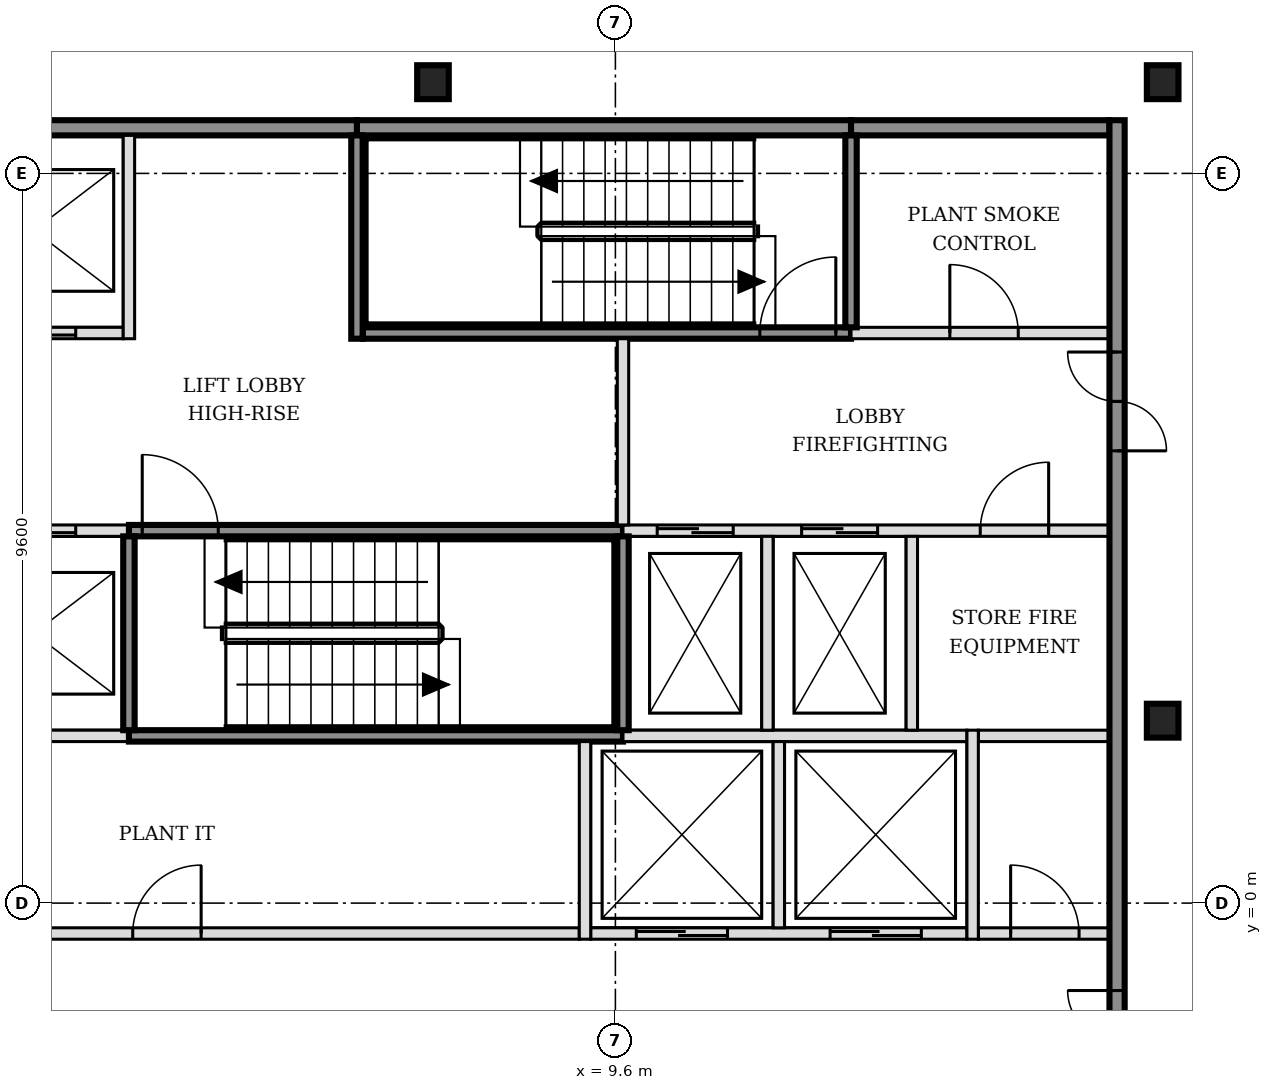
"""IFC4 building model, lengths in metres.
Left out: names, types, materials, properties, quantities, classifications, styles, units other than length and angle.
Written with IfcOpenShell. Run it as: python <this file> out.ifc"""

import sys

from ifc_helpers import new_model, si_unit, direction, frame, frame_2d, origin, origin_2d, place, context, subcontext, project, spatial, rectangle, i_section, extrude, element, fill, save


model = new_model("IFC4")
c1 = context("Model", 3, precision=1e-05, world=origin(), true_north=direction((0.0, 1.0)))
c2 = subcontext(c1, "Body", "Model", "MODEL_VIEW")
j1 = project(units=[si_unit("LENGTHUNIT", "METRE"), si_unit("PLANEANGLEUNIT", "RADIAN")], contexts=[c1])
p1 = place(None, origin())
s1 = spatial("IfcSite", under=j1, at=p1, CompositionType="ELEMENT")
p2 = place(p1, origin())
s2 = spatial("IfcBuilding", under=s1, at=p2, CompositionType="ELEMENT")
p3 = place(p2, frame((0.0, 0.0, 186.6)))
s3 = spatial("IfcBuildingStorey", under=s2, at=p3, CompositionType="ELEMENT", Elevation=186.6)
for number, where, z_axis, x_axis in (
    (1, (16.8, 2.4, -0.15), (0.0, 0.0, 1.0), (1.0, 0.0, 0.0)),
    (2, (7.2, 10.8, -0.15), (0.0, 0.0, 1.0), (1.0, 0.0, 0.0)),
    (3, (16.8, 10.8, -0.15), (0.0, 0.0, 1.0), (1.0, 0.0, 0.0)),
):
    element("IfcColumn", number, at=place(p3, frame(where, z_axis=z_axis, x_axis=x_axis)), inside=s3, PredefinedType="COLUMN", context=c2, shape_type="SweptSolid", body=[
        extrude(i_section(OverallWidth=0.416, OverallDepth=0.446, WebThickness=0.039, FlangeThickness=0.063, FilletRadius=0.015, at=origin_2d()), origin(), (0.0, 0.0, 1.0), 3.6),
    ])
p4 = place(p3, frame((-1.7, -0.4, 0.0), z_axis=(0.0, 0.0, 1.0), x_axis=(1.0, 0.0, 0.0)))
e4 = element("IfcWall", 4, at=p4, inside=s3, PredefinedType="PARTITIONING", context=c2, shape_type="SweptSolid", body=[
    extrude(rectangle(XDim=10.825, YDim=0.15, at=frame_2d((5.413, 0.0))), origin(), (0.0, 0.0, 1.0), 3.45),
])
p5 = place(p4, frame((4.95, 0.0, 0.0)))
e5 = element("IfcOpeningElement", 5, at=p5, cuts=e4, PredefinedType="OPENING", context=c2, shape_type="SweptSolid", body=[
    extrude(rectangle(XDim=0.9, YDim=2.1, at=frame_2d((0.45, 1.05))), frame((0.0, 0.085, 0.0), z_axis=(0.0, -1.0, 0.0), x_axis=(1.0, 0.0, 0.0)), (0.0, 0.0, 1.0), 0.17),
])
p6 = place(p3, frame((9.275, -0.4, 0.0), z_axis=(0.0, 0.0, 1.0), x_axis=(1.0, 0.0, 0.0)))
e6 = element("IfcWall", 6, at=p6, inside=s3, PredefinedType="SOLIDWALL", context=c2, shape_type="SweptSolid", body=[
    extrude(rectangle(XDim=4.95, YDim=0.15, at=frame_2d((2.475, 0.0))), origin(), (0.0, 0.0, 1.0), 3.45),
])
p7 = place(p6, frame((0.6, 0.0, 0.0)))
e7 = element("IfcOpeningElement", 7, at=p7, cuts=e6, PredefinedType="OPENING", context=c2, shape_type="SweptSolid", body=[
    extrude(rectangle(XDim=1.2, YDim=2.1, at=frame_2d((0.6, 1.05))), frame((0.0, 0.085, 0.0), z_axis=(0.0, -1.0, 0.0), x_axis=(1.0, 0.0, 0.0)), (0.0, 0.0, 1.0), 0.17),
])
p8 = place(p6, frame((3.15, 0.0, 0.0)))
e8 = element("IfcOpeningElement", 8, at=p8, cuts=e6, PredefinedType="OPENING", context=c2, shape_type="SweptSolid", body=[
    extrude(rectangle(XDim=1.2, YDim=2.1, at=frame_2d((0.6, 1.05))), frame((0.0, 0.085, 0.0), z_axis=(0.0, -1.0, 0.0), x_axis=(1.0, 0.0, 0.0)), (0.0, 0.0, 1.0), 0.17),
])
p9 = place(p3, frame((14.375, -0.4, 0.0), z_axis=(0.0, 0.0, 1.0), x_axis=(1.0, 0.0, 0.0)))
e9 = element("IfcWall", 9, at=p9, inside=s3, PredefinedType="PARTITIONING", context=c2, shape_type="SweptSolid", body=[
    extrude(rectangle(XDim=1.725, YDim=0.15, at=frame_2d((0.863, 0.0))), origin(), (0.0, 0.0, 1.0), 3.45),
])
p10 = place(p9, frame((0.425, 0.0, 0.0)))
e10 = element("IfcOpeningElement", 10, at=p10, cuts=e9, PredefinedType="OPENING", context=c2, shape_type="SweptSolid", body=[
    extrude(rectangle(XDim=0.9, YDim=2.1, at=frame_2d((0.45, 1.05))), frame((0.0, 0.085, 0.0), z_axis=(0.0, -1.0, 0.0), x_axis=(1.0, 0.0, 0.0)), (0.0, 0.0, 1.0), 0.17),
])
p11 = place(p3, frame((-1.7, 2.2, 0.0), z_axis=(0.0, 0.0, 1.0), x_axis=(1.0, 0.0, 0.0)))
e11 = element("IfcWall", 11, at=p11, inside=s3, PredefinedType="SOLIDWALL", context=c2, shape_type="SweptSolid", body=[
    extrude(rectangle(XDim=4.9, YDim=0.15, at=frame_2d((2.45, 0.0))), origin(), (0.0, 0.0, 1.0), 3.45),
])
p12 = place(p3, frame((3.2, 2.2, 0.0), z_axis=(0.0, 0.0, 1.0), x_axis=(1.0, 0.0, 0.0)))
e12 = element("IfcWall", 12, at=p12, inside=s3, PredefinedType="SOLIDWALL", context=c2, shape_type="SweptSolid", body=[
    extrude(rectangle(XDim=6.5, YDim=0.15, at=frame_2d((3.25, 0.0))), origin(), (0.0, 0.0, 1.0), 3.45),
])
p13 = place(p3, frame((9.7, 2.2, 0.0), z_axis=(0.0, 0.0, 1.0), x_axis=(1.0, 0.0, 0.0)))
e13 = element("IfcWall", 13, at=p13, inside=s3, PredefinedType="SOLIDWALL", context=c2, shape_type="SweptSolid", body=[
    extrude(rectangle(XDim=4.525, YDim=0.15, at=frame_2d((2.263, 0.0))), origin(), (0.0, 0.0, 1.0), 3.45),
])
p14 = place(p3, frame((14.375, 2.2, 0.0), z_axis=(0.0, 0.0, 1.0), x_axis=(1.0, 0.0, 0.0)))
e14 = element("IfcWall", 14, at=p14, inside=s3, PredefinedType="PARTITIONING", context=c2, shape_type="SweptSolid", body=[
    extrude(rectangle(XDim=1.725, YDim=0.15, at=frame_2d((0.863, 0.0))), origin(), (0.0, 0.0, 1.0), 3.45),
])
p15 = place(p3, frame((-1.7, 4.9, 0.0), z_axis=(0.0, 0.0, 1.0), x_axis=(1.0, 0.0, 0.0)))
e15 = element("IfcWall", 15, at=p15, inside=s3, PredefinedType="SOLIDWALL", context=c2, shape_type="SweptSolid", body=[
    extrude(rectangle(XDim=4.9, YDim=0.15, at=frame_2d((2.45, 0.0))), origin(), (0.0, 0.0, 1.0), 3.45),
])
p16 = place(p15, frame((0.6, 0.0, 0.0)))
e16 = element("IfcOpeningElement", 16, at=p16, cuts=e15, PredefinedType="OPENING", context=c2, shape_type="SweptSolid", body=[
    extrude(rectangle(XDim=1.1, YDim=2.1, at=frame_2d((0.55, 1.05))), frame((0.0, 0.085, 0.0), z_axis=(0.0, -1.0, 0.0), x_axis=(1.0, 0.0, 0.0)), (0.0, 0.0, 1.0), 0.17),
])
p17 = place(p15, frame((3.1, 0.0, 0.0)))
e17 = element("IfcOpeningElement", 17, at=p17, cuts=e15, PredefinedType="OPENING", context=c2, shape_type="SweptSolid", body=[
    extrude(rectangle(XDim=1.1, YDim=2.1, at=frame_2d((0.55, 1.05))), frame((0.0, 0.085, 0.0), z_axis=(0.0, -1.0, 0.0), x_axis=(1.0, 0.0, 0.0)), (0.0, 0.0, 1.0), 0.17),
])
p18 = place(p3, frame((3.2, 4.9, 0.0), z_axis=(0.0, 0.0, 1.0), x_axis=(1.0, 0.0, 0.0)))
e18 = element("IfcWall", 18, at=p18, inside=s3, PredefinedType="SOLIDWALL", context=c2, shape_type="SweptSolid", body=[
    extrude(rectangle(XDim=6.5, YDim=0.15, at=frame_2d((3.25, 0.0))), origin(), (0.0, 0.0, 1.0), 3.45),
])
p19 = place(p18, frame((0.175, 0.0, 0.0)))
e19 = element("IfcOpeningElement", 19, at=p19, cuts=e18, PredefinedType="OPENING", context=c2, shape_type="SweptSolid", body=[
    extrude(rectangle(XDim=1.0, YDim=2.1, at=frame_2d((0.5, 1.05))), frame((0.0, 0.085, 0.0), z_axis=(0.0, -1.0, 0.0), x_axis=(1.0, 0.0, 0.0)), (0.0, 0.0, 1.0), 0.17),
])
p20 = place(p3, frame((9.7, 4.9, 0.0), z_axis=(0.0, 0.0, 1.0), x_axis=(1.0, 0.0, 0.0)))
e20 = element("IfcWall", 20, at=p20, inside=s3, PredefinedType="SOLIDWALL", context=c2, shape_type="SweptSolid", body=[
    extrude(rectangle(XDim=6.4, YDim=0.15, at=frame_2d((3.2, 0.0))), origin(), (0.0, 0.0, 1.0), 3.45),
])
p21 = place(p20, frame((0.45, 0.0, 0.0)))
e21 = element("IfcOpeningElement", 21, at=p21, cuts=e20, PredefinedType="OPENING", context=c2, shape_type="SweptSolid", body=[
    extrude(rectangle(XDim=1.0, YDim=2.1, at=frame_2d((0.5, 1.05))), frame((0.0, 0.085, 0.0), z_axis=(0.0, -1.0, 0.0), x_axis=(1.0, 0.0, 0.0)), (0.0, 0.0, 1.0), 0.17),
])
p22 = place(p20, frame((2.35, 0.0, 0.0)))
e22 = element("IfcOpeningElement", 22, at=p22, cuts=e20, PredefinedType="OPENING", context=c2, shape_type="SweptSolid", body=[
    extrude(rectangle(XDim=1.0, YDim=2.1, at=frame_2d((0.5, 1.05))), frame((0.0, 0.085, 0.0), z_axis=(0.0, -1.0, 0.0), x_axis=(1.0, 0.0, 0.0)), (0.0, 0.0, 1.0), 0.17),
])
p23 = place(p20, frame((4.7, 0.0, 0.0)))
e23 = element("IfcOpeningElement", 23, at=p23, cuts=e20, PredefinedType="OPENING", context=c2, shape_type="SweptSolid", body=[
    extrude(rectangle(XDim=0.9, YDim=2.1, at=frame_2d((0.45, 1.05))), frame((0.0, 0.085, 0.0), z_axis=(0.0, -1.0, 0.0), x_axis=(1.0, 0.0, 0.0)), (0.0, 0.0, 1.0), 0.17),
])
p24 = place(p3, frame((-1.7, 7.5, 0.0), z_axis=(0.0, 0.0, 1.0), x_axis=(1.0, 0.0, 0.0)))
e24 = element("IfcWall", 24, at=p24, inside=s3, PredefinedType="SOLIDWALL", context=c2, shape_type="SweptSolid", body=[
    extrude(rectangle(XDim=4.825, YDim=0.15, at=frame_2d((2.413, 0.0))), origin(), (0.0, 0.0, 1.0), 3.45),
])
p25 = place(p24, frame((0.6, 0.0, 0.0)))
e25 = element("IfcOpeningElement", 25, at=p25, cuts=e24, PredefinedType="OPENING", context=c2, shape_type="SweptSolid", body=[
    extrude(rectangle(XDim=1.1, YDim=2.1, at=frame_2d((0.55, 1.05))), frame((0.0, 0.085, 0.0), z_axis=(0.0, -1.0, 0.0), x_axis=(1.0, 0.0, 0.0)), (0.0, 0.0, 1.0), 0.17),
])
p26 = place(p24, frame((3.1, 0.0, 0.0)))
e26 = element("IfcOpeningElement", 26, at=p26, cuts=e24, PredefinedType="OPENING", context=c2, shape_type="SweptSolid", body=[
    extrude(rectangle(XDim=1.1, YDim=2.1, at=frame_2d((0.55, 1.05))), frame((0.0, 0.085, 0.0), z_axis=(0.0, -1.0, 0.0), x_axis=(1.0, 0.0, 0.0)), (0.0, 0.0, 1.0), 0.17),
])
p27 = place(p3, frame((6.275, 7.5, 0.0), z_axis=(0.0, 0.0, 1.0), x_axis=(1.0, 0.0, 0.0)))
e27 = element("IfcWall", 27, at=p27, inside=s3, PredefinedType="SOLIDWALL", context=c2, shape_type="SweptSolid", body=[
    extrude(rectangle(XDim=6.425, YDim=0.15, at=frame_2d((3.212, 0.0))), origin(), (0.0, 0.0, 1.0), 3.45),
])
p28 = place(p27, frame((5.225, 0.0, 0.0)))
e28 = element("IfcOpeningElement", 28, at=p28, cuts=e27, PredefinedType="OPENING", context=c2, shape_type="SweptSolid", body=[
    extrude(rectangle(XDim=1.0, YDim=2.1, at=frame_2d((0.5, 1.05))), frame((0.0, 0.085, 0.0), z_axis=(0.0, -1.0, 0.0), x_axis=(1.0, 0.0, 0.0)), (0.0, 0.0, 1.0), 0.17),
])
p29 = place(p3, frame((12.7, 7.5, 0.0), z_axis=(0.0, 0.0, 1.0), x_axis=(1.0, 0.0, 0.0)))
e29 = element("IfcWall", 29, at=p29, inside=s3, PredefinedType="SOLIDWALL", context=c2, shape_type="SweptSolid", body=[
    extrude(rectangle(XDim=3.4, YDim=0.15, at=frame_2d((1.7, 0.0))), origin(), (0.0, 0.0, 1.0), 3.45),
])
p30 = place(p29, frame((1.3, 0.0, 0.0)))
e30 = element("IfcOpeningElement", 30, at=p30, cuts=e29, PredefinedType="OPENING", context=c2, shape_type="SweptSolid", body=[
    extrude(rectangle(XDim=0.9, YDim=2.1, at=frame_2d((0.45, 1.05))), frame((0.0, 0.085, 0.0), z_axis=(0.0, -1.0, 0.0), x_axis=(1.0, 0.0, 0.0)), (0.0, 0.0, 1.0), 0.17),
])
p31 = place(p3, frame((-1.7, 10.2, 0.0), z_axis=(0.0, 0.0, 1.0), x_axis=(1.0, 0.0, 0.0)))
e31 = element("IfcWall", 31, at=p31, inside=s3, PredefinedType="SOLIDWALL", context=c2, shape_type="SweptSolid", body=[
    extrude(rectangle(XDim=7.9, YDim=0.2, at=frame_2d((3.95, 0.0))), origin(), (0.0, 0.0, 1.0), 3.45),
])
p32 = place(p3, frame((6.2, 10.2, 0.0), z_axis=(0.0, 0.0, 1.0), x_axis=(1.0, 0.0, 0.0)))
e32 = element("IfcWall", 32, at=p32, inside=s3, PredefinedType="SOLIDWALL", context=c2, shape_type="SweptSolid", body=[
    extrude(rectangle(XDim=6.5, YDim=0.2, at=frame_2d((3.25, 0.0))), origin(), (0.0, 0.0, 1.0), 3.45),
])
p33 = place(p3, frame((12.7, 10.2, 0.0), z_axis=(0.0, 0.0, 1.0), x_axis=(1.0, 0.0, 0.0)))
e33 = element("IfcWall", 33, at=p33, inside=s3, PredefinedType="SOLIDWALL", context=c2, shape_type="SweptSolid", body=[
    extrude(rectangle(XDim=3.4, YDim=0.2, at=frame_2d((1.7, 0.0))), origin(), (0.0, 0.0, 1.0), 3.45),
])
p34 = place(p3, frame((3.2, 2.275, 0.0), z_axis=(0.0, 0.0, 1.0), x_axis=(0.0, 1.0, 0.0)))
e34 = element("IfcWall", 34, at=p34, inside=s3, PredefinedType="SOLIDWALL", context=c2, shape_type="SweptSolid", body=[
    extrude(rectangle(XDim=2.55, YDim=0.15, at=frame_2d((1.275, 0.0))), origin(), (0.0, 0.0, 1.0), 3.45),
])
for number, where, z_axis, x_axis in (
    (35, (3.2, 7.425, 0.0), (0.0, 0.0, 1.0), (0.0, 1.0, 0.0)),
    (36, (6.2, 7.425, 0.0), (0.0, 0.0, 1.0), (0.0, 1.0, 0.0)),
):
    element("IfcWall", number, at=place(p3, frame(where, z_axis=z_axis, x_axis=x_axis)), inside=s3, PredefinedType="SOLIDWALL", context=c2, shape_type="SweptSolid", body=[
        extrude(rectangle(XDim=2.675, YDim=0.15, at=frame_2d((1.337, 0.0))), origin(), (0.0, 0.0, 1.0), 3.45),
    ])
p35 = place(p3, frame((9.2, -0.475, 0.0), z_axis=(0.0, 0.0, 1.0), x_axis=(0.0, 1.0, 0.0)))
e37 = element("IfcWall", 37, at=p35, inside=s3, PredefinedType="SOLIDWALL", context=c2, shape_type="SweptSolid", body=[
    extrude(rectangle(XDim=2.6, YDim=0.15, at=frame_2d((1.3, 0.0))), origin(), (0.0, 0.0, 1.0), 3.45),
])
p36 = place(p3, frame((9.7, 2.275, 0.0), z_axis=(0.0, 0.0, 1.0), x_axis=(0.0, 1.0, 0.0)))
e38 = element("IfcWall", 38, at=p36, inside=s3, PredefinedType="SOLIDWALL", context=c2, shape_type="SweptSolid", body=[
    extrude(rectangle(XDim=2.55, YDim=0.15, at=frame_2d((1.275, 0.0))), origin(), (0.0, 0.0, 1.0), 3.45),
])
p37 = place(p3, frame((9.7, 4.975, 0.0), z_axis=(0.0, 0.0, 1.0), x_axis=(0.0, 1.0, 0.0)))
e39 = element("IfcWall", 39, at=p37, inside=s3, PredefinedType="SOLIDWALL", context=c2, shape_type="SweptSolid", body=[
    extrude(rectangle(XDim=2.45, YDim=0.15, at=frame_2d((1.225, 0.0))), origin(), (0.0, 0.0, 1.0), 3.45),
])
p38 = place(p3, frame((11.6, 2.275, 0.0), z_axis=(0.0, 0.0, 1.0), x_axis=(0.0, 1.0, 0.0)))
e40 = element("IfcWall", 40, at=p38, inside=s3, PredefinedType="SOLIDWALL", context=c2, shape_type="SweptSolid", body=[
    extrude(rectangle(XDim=2.55, YDim=0.15, at=frame_2d((1.275, 0.0))), origin(), (0.0, 0.0, 1.0), 3.45),
])
p39 = place(p3, frame((11.75, -0.325, 0.0), z_axis=(0.0, 0.0, 1.0), x_axis=(0.0, 1.0, 0.0)))
e41 = element("IfcWall", 41, at=p39, inside=s3, PredefinedType="SOLIDWALL", context=c2, shape_type="SweptSolid", body=[
    extrude(rectangle(XDim=2.45, YDim=0.15, at=frame_2d((1.225, 0.0))), origin(), (0.0, 0.0, 1.0), 3.45),
])
p40 = place(p3, frame((12.7, 7.575, 0.0), z_axis=(0.0, 0.0, 1.0), x_axis=(0.0, 1.0, 0.0)))
e42 = element("IfcWall", 42, at=p40, inside=s3, PredefinedType="SOLIDWALL", context=c2, shape_type="SweptSolid", body=[
    extrude(rectangle(XDim=2.525, YDim=0.15, at=frame_2d((1.263, 0.0))), origin(), (0.0, 0.0, 1.0), 3.45),
])
p41 = place(p3, frame((13.5, 2.275, 0.0), z_axis=(0.0, 0.0, 1.0), x_axis=(0.0, 1.0, 0.0)))
e43 = element("IfcWall", 43, at=p41, inside=s3, PredefinedType="SOLIDWALL", context=c2, shape_type="SweptSolid", body=[
    extrude(rectangle(XDim=2.55, YDim=0.15, at=frame_2d((1.275, 0.0))), origin(), (0.0, 0.0, 1.0), 3.45),
])
p42 = place(p3, frame((14.3, -0.475, 0.0), z_axis=(0.0, 0.0, 1.0), x_axis=(0.0, 1.0, 0.0)))
e44 = element("IfcWall", 44, at=p42, inside=s3, PredefinedType="SOLIDWALL", context=c2, shape_type="SweptSolid", body=[
    extrude(rectangle(XDim=2.75, YDim=0.15, at=frame_2d((1.375, 0.0))), origin(), (0.0, 0.0, 1.0), 3.45),
])
p43 = place(p3, frame((16.2, -5.5, 0.0), z_axis=(0.0, 0.0, 1.0), x_axis=(0.0, 1.0, 0.0)))
e45 = element("IfcWall", 45, at=p43, inside=s3, PredefinedType="SOLIDWALL", context=c2, shape_type="SweptSolid", body=[
    extrude(rectangle(XDim=15.8, YDim=0.2, at=frame_2d((7.9, 0.0))), origin(), (0.0, 0.0, 1.0), 3.45),
])
p44 = place(p43, frame((3.05, 0.0, 0.0)))
e46 = element("IfcOpeningElement", 46, at=p44, cuts=e45, PredefinedType="OPENING", context=c2, shape_type="SweptSolid", body=[
    extrude(rectangle(XDim=1.3, YDim=2.1, at=frame_2d((0.65, 1.05))), frame((0.0, 0.11, 0.0), z_axis=(0.0, -1.0, 0.0), x_axis=(1.0, 0.0, 0.0)), (0.0, 0.0, 1.0), 0.22),
])
p45 = place(p43, frame((11.45, 0.0, 0.0)))
e47 = element("IfcOpeningElement", 47, at=p45, cuts=e45, PredefinedType="OPENING", context=c2, shape_type="SweptSolid", body=[
    extrude(rectangle(XDim=1.3, YDim=2.1, at=frame_2d((0.65, 1.05))), frame((0.0, 0.11, 0.0), z_axis=(0.0, -1.0, 0.0), x_axis=(1.0, 0.0, 0.0)), (0.0, 0.0, 1.0), 0.22),
])
p46 = place(p7, origin())
e48 = element("IfcDoor", 48, at=p46, inside=s3, OperationType="DOUBLE_DOOR_SLIDING", PredefinedType="DOOR", context=c2, shape_type="SweptSolid", body=[
    extrude(rectangle(XDim=1.2, YDim=2.1, at=frame_2d((0.6, 1.05))), frame((0.0, 0.025, 0.0), z_axis=(0.0, -1.0, 0.0), x_axis=(1.0, 0.0, 0.0)), (0.0, 0.0, 1.0), 0.05),
])
fill(e7, e48)
p47 = place(p8, origin())
e49 = element("IfcDoor", 49, at=p47, inside=s3, OperationType="DOUBLE_DOOR_SLIDING", PredefinedType="DOOR", context=c2, shape_type="SweptSolid", body=[
    extrude(rectangle(XDim=1.2, YDim=2.1, at=frame_2d((0.6, 1.05))), frame((0.0, 0.025, 0.0), z_axis=(0.0, -1.0, 0.0), x_axis=(1.0, 0.0, 0.0)), (0.0, 0.0, 1.0), 0.05),
])
fill(e8, e49)
p48 = place(p17, origin())
e50 = element("IfcDoor", 50, at=p48, inside=s3, OperationType="DOUBLE_DOOR_SLIDING", PredefinedType="DOOR", context=c2, shape_type="SweptSolid", body=[
    extrude(rectangle(XDim=1.1, YDim=2.1, at=frame_2d((0.55, 1.05))), frame((0.0, 0.025, 0.0), z_axis=(0.0, -1.0, 0.0), x_axis=(1.0, 0.0, 0.0)), (0.0, 0.0, 1.0), 0.05),
])
fill(e17, e50)
p49 = place(p26, origin())
e51 = element("IfcDoor", 51, at=p49, inside=s3, OperationType="DOUBLE_DOOR_SLIDING", PredefinedType="DOOR", context=c2, shape_type="SweptSolid", body=[
    extrude(rectangle(XDim=1.1, YDim=2.1, at=frame_2d((0.55, 1.05))), frame((0.0, 0.025, 0.0), z_axis=(0.0, -1.0, 0.0), x_axis=(1.0, 0.0, 0.0)), (0.0, 0.0, 1.0), 0.05),
])
fill(e26, e51)
p50 = place(p21, origin())
e52 = element("IfcDoor", 52, at=p50, inside=s3, OperationType="DOUBLE_DOOR_SLIDING", PredefinedType="DOOR", context=c2, shape_type="SweptSolid", body=[
    extrude(rectangle(XDim=1.0, YDim=2.1, at=frame_2d((0.5, 1.05))), frame((0.0, 0.025, 0.0), z_axis=(0.0, -1.0, 0.0), x_axis=(1.0, 0.0, 0.0)), (0.0, 0.0, 1.0), 0.05),
])
fill(e21, e52)
p51 = place(p22, origin())
e53 = element("IfcDoor", 53, at=p51, inside=s3, OperationType="DOUBLE_DOOR_SLIDING", PredefinedType="DOOR", context=c2, shape_type="SweptSolid", body=[
    extrude(rectangle(XDim=1.0, YDim=2.1, at=frame_2d((0.5, 1.05))), frame((0.0, 0.025, 0.0), z_axis=(0.0, -1.0, 0.0), x_axis=(1.0, 0.0, 0.0)), (0.0, 0.0, 1.0), 0.05),
])
fill(e22, e53)
p52 = place(p19, origin())
e54 = element("IfcDoor", 54, at=p52, inside=s3, OperationType="SINGLE_SWING_LEFT", PredefinedType="DOOR", context=c2, shape_type="SweptSolid", body=[
    extrude(rectangle(XDim=1.0, YDim=2.1, at=frame_2d((0.5, 1.05))), frame((0.0, 0.025, 0.0), z_axis=(0.0, -1.0, 0.0), x_axis=(1.0, 0.0, 0.0)), (0.0, 0.0, 1.0), 0.05),
])
fill(e19, e54)
p53 = place(p28, origin())
e55 = element("IfcDoor", 55, at=p53, inside=s3, OperationType="SINGLE_SWING_RIGHT", PredefinedType="DOOR", context=c2, shape_type="SweptSolid", body=[
    extrude(rectangle(XDim=1.0, YDim=2.1, at=frame_2d((0.5, 1.05))), frame((0.0, 0.025, 0.0), z_axis=(0.0, -1.0, 0.0), x_axis=(1.0, 0.0, 0.0)), (0.0, 0.0, 1.0), 0.05),
])
fill(e28, e55)
p54 = place(p44, origin())
e56 = element("IfcDoor", 56, at=p54, inside=s3, OperationType="DOUBLE_DOOR_SINGLE_SWING", PredefinedType="DOOR", context=c2, shape_type="SweptSolid", body=[
    extrude(rectangle(XDim=1.3, YDim=2.1, at=frame_2d((0.65, 1.05))), frame((0.0, 0.025, 0.0), z_axis=(0.0, -1.0, 0.0), x_axis=(1.0, 0.0, 0.0)), (0.0, 0.0, 1.0), 0.05),
])
fill(e46, e56)
p55 = place(p45, origin())
e57 = element("IfcDoor", 57, at=p55, inside=s3, OperationType="DOUBLE_DOOR_SINGLE_SWING", PredefinedType="DOOR", context=c2, shape_type="SweptSolid", body=[
    extrude(rectangle(XDim=1.3, YDim=2.1, at=frame_2d((0.65, 1.05))), frame((0.0, 0.025, 0.0), z_axis=(0.0, -1.0, 0.0), x_axis=(1.0, 0.0, 0.0)), (0.0, 0.0, 1.0), 0.05),
])
fill(e47, e57)
p56 = place(p10, origin())
e58 = element("IfcDoor", 58, at=p56, inside=s3, OperationType="SINGLE_SWING_LEFT", PredefinedType="DOOR", context=c2, shape_type="SweptSolid", body=[
    extrude(rectangle(XDim=0.9, YDim=2.1, at=frame_2d((0.45, 1.05))), frame((0.0, 0.025, 0.0), z_axis=(0.0, -1.0, 0.0), x_axis=(1.0, 0.0, 0.0)), (0.0, 0.0, 1.0), 0.05),
])
fill(e10, e58)
p57 = place(p23, origin())
e59 = element("IfcDoor", 59, at=p57, inside=s3, OperationType="SINGLE_SWING_RIGHT", PredefinedType="DOOR", context=c2, shape_type="SweptSolid", body=[
    extrude(rectangle(XDim=0.9, YDim=2.1, at=frame_2d((0.45, 1.05))), frame((0.0, 0.025, 0.0), z_axis=(0.0, -1.0, 0.0), x_axis=(1.0, 0.0, 0.0)), (0.0, 0.0, 1.0), 0.05),
])
fill(e23, e59)
p58 = place(p30, origin())
e60 = element("IfcDoor", 60, at=p58, inside=s3, OperationType="SINGLE_SWING_LEFT", PredefinedType="DOOR", context=c2, shape_type="SweptSolid", body=[
    extrude(rectangle(XDim=0.9, YDim=2.1, at=frame_2d((0.45, 1.05))), frame((0.0, 0.025, 0.0), z_axis=(0.0, -1.0, 0.0), x_axis=(1.0, 0.0, 0.0)), (0.0, 0.0, 1.0), 0.05),
])
fill(e30, e60)
p59 = place(p5, origin())
e61 = element("IfcDoor", 61, at=p59, inside=s3, OperationType="SINGLE_SWING_RIGHT", PredefinedType="DOOR", context=c2, shape_type="SweptSolid", body=[
    extrude(rectangle(XDim=0.9, YDim=2.1, at=frame_2d((0.45, 1.05))), frame((0.0, 0.025, 0.0), z_axis=(0.0, -1.0, 0.0), x_axis=(1.0, 0.0, 0.0)), (0.0, 0.0, 1.0), 0.05),
])
fill(e5, e61)
save(model, sys.argv[1])
